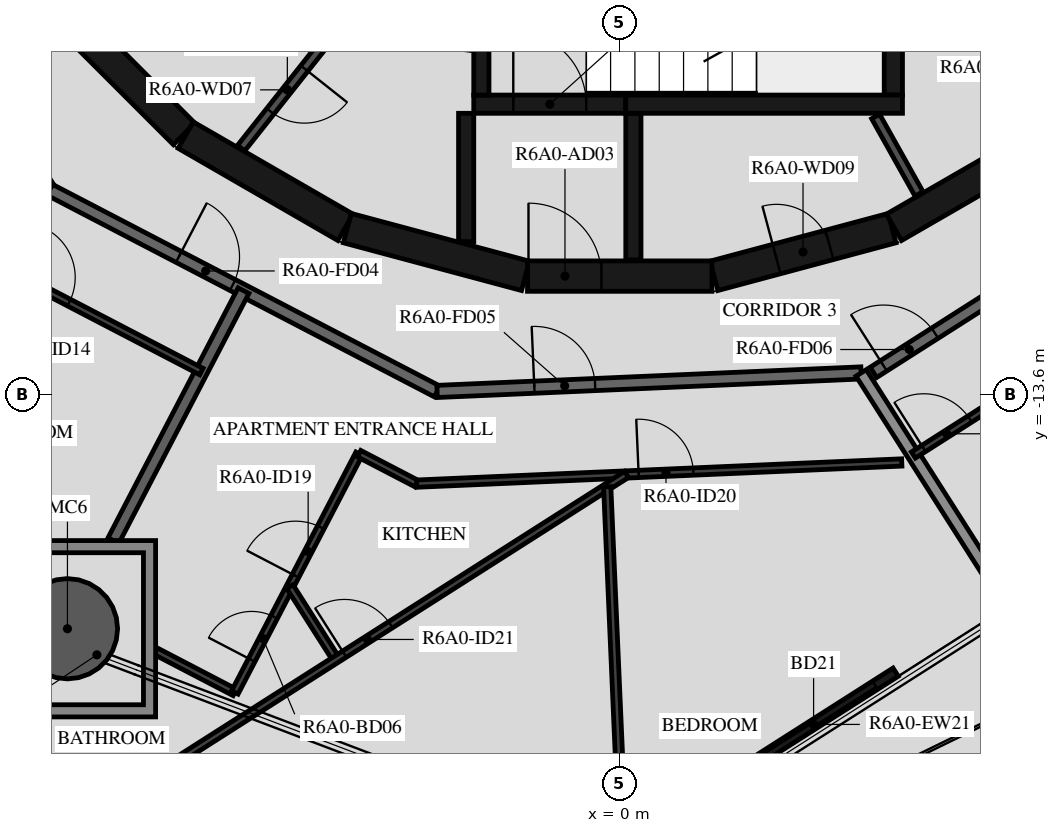
"""IFC4 building model, lengths in metres.
Left out: names, types, materials, properties, quantities, classifications, styles, units other than length and angle.
Written with IfcOpenShell. Run it as: python <this file> out.ifc"""

import sys

from ifc_helpers import new_model, si_unit, direction, frame, frame_2d, origin, origin_2d, place, context, subcontext, project, spatial, polyline, rectangle, hollow_circle, outline, extrude, element, fill, save


model = new_model("IFC4")
c1 = context("Model", 3, precision=1e-05, world=origin(), true_north=direction((0.0, 1.0)))
c2 = subcontext(c1, "Body", "Model", "MODEL_VIEW")
j1 = project(units=[si_unit("LENGTHUNIT", "METRE"), si_unit("PLANEANGLEUNIT", "RADIAN")], contexts=[c1])
p1 = place(None, origin())
s1 = spatial("IfcSite", under=j1, at=p1, CompositionType="ELEMENT")
p2 = place(p1, origin())
s2 = spatial("IfcBuilding", under=s1, at=p2, CompositionType="ELEMENT")
p3 = place(p2, frame((0.0, 0.0, 226.7)))
s3 = spatial("IfcBuildingStorey", under=s2, at=p3, CompositionType="ELEMENT", Elevation=226.7)
p4 = place(p3, frame((-9.082, -17.446, -0.45), z_axis=(0.0, 0.0, 1.0), x_axis=(1.0, 0.0, 0.0)))
e1 = element("IfcColumn", 1, at=p4, inside=s3, PredefinedType="COLUMN", context=c2, shape_type="SweptSolid", body=[
    extrude(hollow_circle(Radius=0.825, WallThickness=0.04, at=origin_2d()), origin(), (0.0, 0.0, 1.0), 3.57),
])
p5 = place(p3, frame((1.839, -19.879, 0.0), z_axis=(0.0, 0.0, 1.0), x_axis=(0.843419508298, 0.53725555653, 0.0)))
e2 = element("IfcWall", 2, at=p5, inside=s3, PredefinedType="STANDARD", context=c2, shape_type="SweptSolid", body=[
    extrude(rectangle(XDim=3.2, YDim=0.16, at=frame_2d((1.6, 0.0))), origin(), (0.0, 0.0, 1.0), 3.12),
])
p6 = place(p5, frame((0.4, 0.0, 0.0)))
e3 = element("IfcOpeningElement", 3, at=p6, cuts=e2, PredefinedType="OPENING", context=c2, shape_type="SweptSolid", body=[
    extrude(rectangle(XDim=2.4, YDim=2.4, at=frame_2d((1.2, 1.2))), frame((0.0, 0.09, 0.0), z_axis=(0.0, -1.0, 0.0), x_axis=(1.0, 0.0, 0.0)), (0.0, 0.0, 1.0), 0.18),
])
p7 = place(p3, frame((1.55, -11.643, 0.0), z_axis=(0.0, 0.0, 1.0), x_axis=(0.965948410781, 0.258734743916, 0.0)))
e4 = element("IfcWall", 4, at=p7, inside=s3, PredefinedType="SHEAR", context=c2, shape_type="SweptSolid", body=[
    extrude(rectangle(XDim=3.033, YDim=0.5, at=frame_2d((1.516, 0.0))), origin(), (0.0, 0.0, 1.0), 3.12),
])
p8 = place(p7, frame((1.066, 0.0, 0.0)))
e5 = element("IfcOpeningElement", 5, at=p8, cuts=e4, PredefinedType="OPENING", context=c2, shape_type="SweptSolid", body=[
    extrude(rectangle(XDim=0.9, YDim=2.1, at=frame_2d((0.45, 1.05))), frame((0.0, 0.26, 0.0), z_axis=(0.0, -1.0, 0.0), x_axis=(1.0, 0.0, 0.0)), (0.0, 0.0, 1.0), 0.52),
])
p9 = place(p3, frame((4.51, -10.845, 0.0), z_axis=(0.0, 0.0, 1.0), x_axis=(0.865975092491, 0.500087131594, 0.0)))
e6 = element("IfcWall", 6, at=p9, inside=s3, PredefinedType="SHEAR", context=c2, shape_type="SweptSolid", body=[
    extrude(rectangle(XDim=3.033, YDim=0.5, at=frame_2d((1.516, 0.0))), origin(), (0.0, 0.0, 1.0), 3.12),
])
p10 = place(p3, frame((-9.308, -7.164, 0.0), z_axis=(0.0, 0.0, 1.0), x_axis=(0.707106781187, -0.707106781187, 0.0)))
e7 = element("IfcWall", 7, at=p10, inside=s3, PredefinedType="SHEAR", context=c2, shape_type="SweptSolid", body=[
    extrude(rectangle(XDim=3.032, YDim=0.5, at=frame_2d((1.516, 0.0))), origin(), (0.0, 0.0, 1.0), 3.12),
])
for number, where, z_axis, x_axis in (
    (8, (-7.137, -9.329, 0.0), (0.0, 0.0, 1.0), (0.866, -0.5, 0.0)),
    (9, (-4.479, -10.858, 0.0), (0.0, 0.0, 1.0), (0.966, -0.259, 0.0)),
):
    element("IfcWall", number, at=place(p3, frame(where, z_axis=z_axis, x_axis=x_axis)), inside=s3, PredefinedType="SHEAR", context=c2, shape_type="SweptSolid", body=[
        extrude(rectangle(XDim=3.033, YDim=0.5, at=frame_2d((1.516, 0.0))), origin(), (0.0, 0.0, 1.0), 3.12),
    ])
p11 = place(p3, frame((-1.516, -11.647, 0.0), z_axis=(0.0, 0.0, 1.0), x_axis=(1.0, 0.0, 0.0)))
e10 = element("IfcWall", 10, at=p11, inside=s3, PredefinedType="SHEAR", context=c2, shape_type="SweptSolid", body=[
    extrude(rectangle(XDim=3.033, YDim=0.5, at=frame_2d((1.516, 0.0))), origin(), (0.0, 0.0, 1.0), 3.12),
])
p12 = place(p11, frame((0.016, 0.0, 0.0)))
e11 = element("IfcOpeningElement", 11, at=p12, cuts=e10, PredefinedType="OPENING", context=c2, shape_type="SweptSolid", body=[
    extrude(rectangle(XDim=1.2, YDim=2.1, at=frame_2d((0.6, 1.05))), frame((0.0, 0.26, 0.0), z_axis=(0.0, -1.0, 0.0), x_axis=(1.0, 0.0, 0.0)), (0.0, 0.0, 1.0), 0.52),
])
p13 = place(p3, frame((-2.275, -8.67, 0.0), z_axis=(0.0, 0.0, 1.0), x_axis=(0.0, 1.0, 0.0)))
e12 = element("IfcWall", 12, at=p13, inside=s3, PredefinedType="SHEAR", context=c2, shape_type="SweptSolid", body=[
    extrude(rectangle(XDim=3.32, YDim=0.25, at=frame_2d((1.66, 0.0))), origin(), (0.0, 0.0, 1.0), 3.12),
])
p14 = place(p3, frame((4.5, -8.67, 0.0), z_axis=(0.0, 0.0, 1.0), x_axis=(0.0, 1.0, 0.0)))
e13 = element("IfcWall", 13, at=p14, inside=s3, PredefinedType="SHEAR", context=c2, shape_type="SweptSolid", body=[
    extrude(rectangle(XDim=3.32, YDim=0.3, at=frame_2d((1.66, 0.0))), origin(), (0.0, 0.0, 1.0), 3.12),
])
p15 = place(p3, frame((0.1, -8.82, 0.0), z_axis=(0.0, 0.0, 1.0), x_axis=(1.0, 0.0, 0.0)))
e14 = element("IfcWall", 14, at=p15, inside=s3, PredefinedType="SHEAR", context=c2, shape_type="SweptSolid", body=[
    extrude(rectangle(XDim=4.55, YDim=0.3, at=frame_2d((2.275, 0.0))), origin(), (0.0, 0.0, 1.0), 3.12),
])
p16 = place(p3, frame((-2.4, -8.82, 0.0), z_axis=(0.0, 0.0, 1.0), x_axis=(1.0, 0.0, 0.0)))
e15 = element("IfcWall", 15, at=p16, inside=s3, PredefinedType="SHEAR", context=c2, shape_type="SweptSolid", body=[
    extrude(rectangle(XDim=2.5, YDim=0.3, at=frame_2d((1.25, 0.0))), origin(), (0.0, 0.0, 1.0), 3.12),
])
p17 = place(p16, frame((0.65, 0.0, 0.0)))
e16 = element("IfcOpeningElement", 16, at=p17, cuts=e15, PredefinedType="OPENING", context=c2, shape_type="SweptSolid", body=[
    extrude(rectangle(XDim=1.2, YDim=2.1, at=frame_2d((0.6, 1.05))), frame((0.0, 0.16, 0.0), z_axis=(0.0, -1.0, 0.0), x_axis=(1.0, 0.0, 0.0)), (0.0, 0.0, 1.0), 0.32),
])
p18 = place(p3, frame((-2.525, -8.97, 0.0), z_axis=(0.0, 0.0, 1.0), x_axis=(0.0, -1.0, 0.0)))
e17 = element("IfcWall", 17, at=p18, inside=s3, PredefinedType="SHEAR", context=c2, shape_type="SweptSolid", body=[
    extrude(rectangle(XDim=2.11, YDim=0.25, at=frame_2d((1.055, 0.0))), origin(), (0.0, 0.0, 1.0), 3.12),
])
p19 = place(p3, frame((0.225, -8.97, 0.0), z_axis=(0.0, 0.0, 1.0), x_axis=(0.0, -1.0, 0.0)))
e18 = element("IfcWall", 18, at=p19, inside=s3, PredefinedType="SHEAR", context=c2, shape_type="SweptSolid", body=[
    extrude(rectangle(XDim=2.41, YDim=0.25, at=frame_2d((1.205, 0.0))), origin(), (0.0, 0.0, 1.0), 3.12),
])
p20 = place(p3, frame((4.922, -10.296, 0.0), z_axis=(0.0, 0.0, 1.0), x_axis=(-0.48860846254, 0.872503163509, 0.0)))
e19 = element("IfcWall", 19, at=p20, inside=s3, PredefinedType="PARTITIONING", context=c2, shape_type="SweptSolid", body=[
    extrude(rectangle(XDim=1.459, YDim=0.15, at=frame_2d((0.73, 0.0))), origin(), (0.0, 0.0, 1.0), 3.12),
])
p21 = place(p3, frame((-4.706, -7.625, 0.0), z_axis=(0.0, 0.0, 1.0), x_axis=(-0.621392599334, -0.783499353856, 0.0)))
e20 = element("IfcWall", 20, at=p21, inside=s3, PredefinedType="PARTITIONING", context=c2, shape_type="SweptSolid", body=[
    extrude(rectangle(XDim=2.447, YDim=0.15, at=frame_2d((1.224, 0.0))), origin(), (0.0, 0.0, 1.0), 3.12),
])
p22 = place(p21, frame((0.774, 0.0, 0.0)))
e21 = element("IfcOpeningElement", 21, at=p22, cuts=e20, PredefinedType="OPENING", context=c2, shape_type="SweptSolid", body=[
    extrude(rectangle(XDim=0.9, YDim=2.1, at=frame_2d((0.45, 1.05))), frame((0.0, 0.085, 0.0), z_axis=(0.0, -1.0, 0.0), x_axis=(1.0, 0.0, 0.0)), (0.0, 0.0, 1.0), 0.17),
])
p23 = place(p3, frame((-11.565, -6.786, 0.0), z_axis=(0.0, 0.0, 1.0), x_axis=(0.537297327359, -0.843392898958, 0.0)))
e22 = element("IfcWall", 22, at=p23, inside=s3, PredefinedType="STANDARD", context=c2, shape_type="SweptSolid", body=[
    extrude(rectangle(XDim=4.081, YDim=0.2, at=frame_2d((2.041, 0.0))), origin(), (0.0, 0.0, 1.0), 3.12),
])
p24 = place(p3, frame((-9.372, -10.228, 0.0), z_axis=(0.0, 0.0, 1.0), x_axis=(0.887005184532, -0.461759464021, 0.0)))
e23 = element("IfcWall", 23, at=p24, inside=s3, PredefinedType="STANDARD", context=c2, shape_type="SweptSolid", body=[
    extrude(rectangle(XDim=7.181, YDim=0.2, at=frame_2d((3.591, 0.0))), origin(), (0.0, 0.0, 1.0), 3.12),
])
p25 = place(p24, frame((2.391, 0.0, 0.0)))
e24 = element("IfcOpeningElement", 24, at=p25, cuts=e23, PredefinedType="OPENING", context=c2, shape_type="SweptSolid", body=[
    extrude(rectangle(XDim=1.0, YDim=2.1, at=frame_2d((0.5, 1.05))), frame((0.0, 0.11, 0.0), z_axis=(0.0, -1.0, 0.0), x_axis=(1.0, 0.0, 0.0)), (0.0, 0.0, 1.0), 0.22),
])
p26 = place(p3, frame((-3.003, -13.544, 0.0), z_axis=(0.0, 0.0, 1.0), x_axis=(0.999048221872, 0.043619380718, 0.0)))
e25 = element("IfcWall", 25, at=p26, inside=s3, PredefinedType="STANDARD", context=c2, shape_type="SweptSolid", body=[
    extrude(rectangle(XDim=6.979, YDim=0.2, at=frame_2d((3.49, 0.0))), origin(), (0.0, 0.0, 1.0), 3.12),
])
p27 = place(p26, frame((1.6, 0.0, 0.0)))
e26 = element("IfcOpeningElement", 26, at=p27, cuts=e25, PredefinedType="OPENING", context=c2, shape_type="SweptSolid", body=[
    extrude(rectangle(XDim=1.0, YDim=2.1, at=frame_2d((0.5, 1.05))), frame((0.0, 0.11, 0.0), z_axis=(0.0, -1.0, 0.0), x_axis=(1.0, 0.0, 0.0)), (0.0, 0.0, 1.0), 0.22),
])
p28 = place(p3, frame((4.172, -13.231, 0.0), z_axis=(0.0, 0.0, 1.0), x_axis=(0.843388394728, 0.537304397561, 0.0)))
e27 = element("IfcWall", 27, at=p28, inside=s3, PredefinedType="STANDARD", context=c2, shape_type="SweptSolid", body=[
    extrude(rectangle(XDim=7.181, YDim=0.2, at=frame_2d((3.59, 0.0))), origin(), (0.0, 0.0, 1.0), 3.12),
])
p29 = place(p28, frame((0.2, 0.0, 0.0)))
e28 = element("IfcOpeningElement", 28, at=p29, cuts=e27, PredefinedType="OPENING", context=c2, shape_type="SweptSolid", body=[
    extrude(rectangle(XDim=1.0, YDim=2.1, at=frame_2d((0.5, 1.05))), frame((0.0, 0.11, 0.0), z_axis=(0.0, -1.0, 0.0), x_axis=(1.0, 0.0, 0.0)), (0.0, 0.0, 1.0), 0.22),
])
p30 = place(p3, frame((-8.326, -15.996, 0.0), z_axis=(0.0, 0.0, 1.0), x_axis=(0.461739255077, 0.887015704664, 0.0)))
e29 = element("IfcWall", 29, at=p30, inside=s3, PredefinedType="STANDARD", context=c2, shape_type="SweptSolid", body=[
    extrude(rectangle(XDim=4.633, YDim=0.2, at=frame_2d((2.317, 0.0))), origin(), (0.0, 0.0, 1.0), 3.12),
])
p31 = place(p3, frame((6.407, -17.064, 0.0), z_axis=(0.0, 0.0, 1.0), x_axis=(-0.537324777979, 0.843375410461, 0.0)))
e30 = element("IfcWall", 30, at=p31, inside=s3, PredefinedType="STANDARD", context=c2, shape_type="SweptSolid", body=[
    extrude(rectangle(XDim=4.535, YDim=0.2, at=frame_2d((2.268, 0.0))), origin(), (0.0, 0.0, 1.0), 2.73),
])
p32 = place(p3, frame((-10.421, -11.373, 0.0), z_axis=(0.0, 0.0, 1.0), x_axis=(0.887006451745, -0.461757029792, 0.0)))
e31 = element("IfcWall", 31, at=p32, inside=s3, PredefinedType="PARTITIONING", context=c2, shape_type="SweptSolid", body=[
    extrude(rectangle(XDim=3.992, YDim=0.12, at=frame_2d((1.996, 0.0))), origin(), (0.0, 0.0, 1.0), 3.12),
])
p33 = place(p32, frame((0.639, 0.0, 0.0)))
e32 = element("IfcOpeningElement", 32, at=p33, cuts=e31, PredefinedType="OPENING", context=c2, shape_type="SweptSolid", body=[
    extrude(rectangle(XDim=0.9, YDim=2.1, at=frame_2d((0.45, 1.05))), frame((0.0, 0.07, 0.0), z_axis=(0.0, -1.0, 0.0), x_axis=(1.0, 0.0, 0.0)), (0.0, 0.0, 1.0), 0.14),
])
p34 = place(p3, frame((-7.632, -17.815, 0.0), z_axis=(0.0, 0.0, 1.0), x_axis=(0.886960889958, -0.461844540602, 0.0)))
e33 = element("IfcWall", 33, at=p34, inside=s3, PredefinedType="PARTITIONING", context=c2, shape_type="SweptSolid", body=[
    extrude(rectangle(XDim=1.469, YDim=0.12, at=frame_2d((0.734, 0.0))), origin(), (0.0, 0.0, 1.0), 3.12),
])
p35 = place(p3, frame((-6.329, -18.494, 0.0), z_axis=(0.0, 0.0, 1.0), x_axis=(0.461759058182, 0.887005395805, 0.0)))
e34 = element("IfcWall", 34, at=p35, inside=s3, PredefinedType="PARTITIONING", context=c2, shape_type="SweptSolid", body=[
    extrude(rectangle(XDim=4.427, YDim=0.12, at=frame_2d((2.213, 0.0))), origin(), (0.0, 0.0, 1.0), 3.12),
])
p36 = place(p35, frame((0.6, 0.0, 0.0)))
e35 = element("IfcOpeningElement", 35, at=p36, cuts=e34, PredefinedType="OPENING", context=c2, shape_type="SweptSolid", body=[
    extrude(rectangle(XDim=0.8, YDim=2.1, at=frame_2d((0.4, 1.05))), frame((0.0, 0.07, 0.0), z_axis=(0.0, -1.0, 0.0), x_axis=(1.0, 0.0, 0.0)), (0.0, 0.0, 1.0), 0.14),
])
p37 = place(p35, frame((2.161, 0.0, 0.0)))
e36 = element("IfcOpeningElement", 36, at=p37, cuts=e34, PredefinedType="OPENING", context=c2, shape_type="SweptSolid", body=[
    extrude(rectangle(XDim=0.9, YDim=2.1, at=frame_2d((0.45, 1.05))), frame((0.0, 0.07, 0.0), z_axis=(0.0, -1.0, 0.0), x_axis=(1.0, 0.0, 0.0)), (0.0, 0.0, 1.0), 0.14),
])
p38 = place(p3, frame((-4.285, -14.567, 0.0), z_axis=(0.0, 0.0, 1.0), x_axis=(0.887033177378, -0.46170568789, 0.0)))
e37 = element("IfcWall", 37, at=p38, inside=s3, PredefinedType="PARTITIONING", context=c2, shape_type="SweptSolid", body=[
    extrude(rectangle(XDim=1.067, YDim=0.12, at=frame_2d((0.534, 0.0))), origin(), (0.0, 0.0, 1.0), 3.12),
])
p39 = place(p3, frame((-3.339, -15.06, 0.0), z_axis=(0.0, 0.0, 1.0), x_axis=(0.999047716945, 0.043630943905, 0.0)))
e38 = element("IfcWall", 38, at=p39, inside=s3, PredefinedType="PARTITIONING", context=c2, shape_type="SweptSolid", body=[
    extrude(rectangle(XDim=7.985, YDim=0.12, at=frame_2d((3.992, 0.0))), origin(), (0.0, 0.0, 1.0), 3.12),
])
p40 = place(p39, frame((3.654, 0.0, 0.0)))
e39 = element("IfcOpeningElement", 39, at=p40, cuts=e38, PredefinedType="OPENING", context=c2, shape_type="SweptSolid", body=[
    extrude(rectangle(XDim=0.9, YDim=2.1, at=frame_2d((0.45, 1.05))), frame((0.0, 0.07, 0.0), z_axis=(0.0, -1.0, 0.0), x_axis=(1.0, 0.0, 0.0)), (0.0, 0.0, 1.0), 0.14),
])
p41 = place(p3, frame((-4.662, -17.95, 0.0), z_axis=(0.0, 0.0, 1.0), x_axis=(-0.537254271207, 0.843420327043, 0.0)))
e40 = element("IfcWall", 40, at=p41, inside=s3, PredefinedType="PARTITIONING", context=c2, shape_type="SweptSolid", body=[
    extrude(rectangle(XDim=1.418, YDim=0.12, at=frame_2d((0.709, 0.0))), origin(), (0.0, 0.0, 1.0), 3.12),
])
p42 = place(p3, frame((-7.322, -19.645, 0.0), z_axis=(0.0, 0.0, 1.0), x_axis=(0.843385361817, 0.537309158188, 0.0)))
e41 = element("IfcWall", 41, at=p42, inside=s3, PredefinedType="PARTITIONING", context=c2, shape_type="SweptSolid", body=[
    extrude(rectangle(XDim=8.814, YDim=0.12, at=frame_2d((4.407, 0.0))), origin(), (0.0, 0.0, 1.0), 3.12),
])
p43 = place(p42, frame((3.314, 0.0, 0.0)))
e42 = element("IfcOpeningElement", 42, at=p43, cuts=e41, PredefinedType="OPENING", context=c2, shape_type="SweptSolid", body=[
    extrude(rectangle(XDim=0.9, YDim=2.1, at=frame_2d((0.45, 1.05))), frame((0.0, 0.07, 0.0), z_axis=(0.0, -1.0, 0.0), x_axis=(1.0, 0.0, 0.0)), (0.0, 0.0, 1.0), 0.14),
])
p44 = place(p3, frame((0.056, -21.11, 0.0), z_axis=(0.0, 0.0, 1.0), x_axis=(-0.043629559022, 0.999047777426, 0.0)))
e43 = element("IfcWall", 43, at=p44, inside=s3, PredefinedType="PARTITIONING", context=c2, shape_type="SweptSolid", body=[
    extrude(rectangle(XDim=6.004, YDim=0.12, at=frame_2d((3.002, 0.0))), origin(), (0.0, 0.0, 1.0), 3.12),
])
p45 = place(p3, frame((4.83, -14.59, 0.0), z_axis=(0.0, 0.0, 1.0), x_axis=(0.843393042763, 0.537297101629, 0.0)))
e44 = element("IfcWall", 44, at=p45, inside=s3, PredefinedType="PARTITIONING", context=c2, shape_type="SweptSolid", body=[
    extrude(rectangle(XDim=7.53, YDim=0.12, at=frame_2d((3.765, 0.0))), origin(), (0.0, 0.0, 1.0), 3.12),
])
p46 = place(p45, frame((0.2, 0.0, 0.0)))
e45 = element("IfcOpeningElement", 45, at=p46, cuts=e44, PredefinedType="OPENING", context=c2, shape_type="SweptSolid", body=[
    extrude(rectangle(XDim=0.9, YDim=2.1, at=frame_2d((0.45, 1.05))), frame((0.0, 0.07, 0.0), z_axis=(0.0, -1.0, 0.0), x_axis=(1.0, 0.0, 0.0)), (0.0, 0.0, 1.0), 0.14),
])
p47 = place(p3, origin())
e46 = element("IfcWall", 46, at=p47, inside=s3, PredefinedType="STANDARD", context=c2, shape_type="SweptSolid", body=[
    extrude(outline(polyline([(-7.632, -15.996), (-7.632, -18.896), (-10.532, -18.896), (-10.532, -15.996), (-7.632, -15.996)]), holes=[polyline([(-10.332, -18.696), (-7.832, -18.696), (-7.832, -16.196), (-10.332, -16.196), (-10.332, -18.696)])]), origin(), (0.0, 0.0, 1.0), 3.12),
])
p48 = place(p6, origin())
e47 = element("IfcDoor", 47, at=p48, inside=s3, OperationType="DOUBLE_DOOR_SLIDING", PredefinedType="DOOR", context=c2, shape_type="SweptSolid", body=[
    extrude(rectangle(XDim=2.4, YDim=2.4, at=frame_2d((1.2, 1.2))), frame((0.0, 0.025, 0.0), z_axis=(0.0, -1.0, 0.0), x_axis=(1.0, 0.0, 0.0)), (0.0, 0.0, 1.0), 0.05),
])
fill(e3, e47)
p49 = place(p17, origin())
e48 = element("IfcDoor", 48, at=p49, inside=s3, OperationType="SINGLE_SWING_LEFT", PredefinedType="DOOR", context=c2, shape_type="SweptSolid", body=[
    extrude(rectangle(XDim=1.2, YDim=2.1, at=frame_2d((0.6, 1.05))), frame((0.0, 0.025, 0.0), z_axis=(0.0, -1.0, 0.0), x_axis=(1.0, 0.0, 0.0)), (0.0, 0.0, 1.0), 0.05),
])
fill(e16, e48)
p50 = place(p12, origin())
e49 = element("IfcDoor", 49, at=p50, inside=s3, OperationType="SINGLE_SWING_RIGHT", PredefinedType="DOOR", context=c2, shape_type="SweptSolid", body=[
    extrude(rectangle(XDim=1.2, YDim=2.1, at=frame_2d((0.6, 1.05))), frame((0.0, 0.025, 0.0), z_axis=(0.0, -1.0, 0.0), x_axis=(1.0, 0.0, 0.0)), (0.0, 0.0, 1.0), 0.05),
])
fill(e11, e49)
p51 = place(p22, origin())
e50 = element("IfcDoor", 50, at=p51, inside=s3, OperationType="SINGLE_SWING_LEFT", PredefinedType="DOOR", context=c2, shape_type="SweptSolid", body=[
    extrude(rectangle(XDim=0.9, YDim=2.1, at=frame_2d((0.45, 1.05))), frame((0.0, 0.025, 0.0), z_axis=(0.0, -1.0, 0.0), x_axis=(1.0, 0.0, 0.0)), (0.0, 0.0, 1.0), 0.05),
])
fill(e21, e50)
p52 = place(p8, origin())
e51 = element("IfcDoor", 51, at=p52, inside=s3, OperationType="SINGLE_SWING_LEFT", PredefinedType="DOOR", context=c2, shape_type="SweptSolid", body=[
    extrude(rectangle(XDim=0.9, YDim=2.1, at=frame_2d((0.45, 1.05))), frame((0.0, 0.025, 0.0), z_axis=(0.0, -1.0, 0.0), x_axis=(1.0, 0.0, 0.0)), (0.0, 0.0, 1.0), 0.05),
])
fill(e5, e51)
p53 = place(p25, origin())
e52 = element("IfcDoor", 52, at=p53, inside=s3, OperationType="SINGLE_SWING_RIGHT", PredefinedType="DOOR", context=c2, shape_type="SweptSolid", body=[
    extrude(rectangle(XDim=1.0, YDim=2.1, at=frame_2d((0.5, 1.05))), frame((0.0, 0.025, 0.0), z_axis=(0.0, -1.0, 0.0), x_axis=(1.0, 0.0, 0.0)), (0.0, 0.0, 1.0), 0.05),
])
fill(e24, e52)
p54 = place(p33, origin())
e53 = element("IfcDoor", 53, at=p54, inside=s3, OperationType="SINGLE_SWING_RIGHT", PredefinedType="DOOR", context=c2, shape_type="SweptSolid", body=[
    extrude(rectangle(XDim=0.9, YDim=2.1, at=frame_2d((0.45, 1.05))), frame((0.0, 0.025, 0.0), z_axis=(0.0, -1.0, 0.0), x_axis=(1.0, 0.0, 0.0)), (0.0, 0.0, 1.0), 0.05),
])
fill(e32, e53)
p55 = place(p27, origin())
e54 = element("IfcDoor", 54, at=p55, inside=s3, OperationType="SINGLE_SWING_LEFT", PredefinedType="DOOR", context=c2, shape_type="SweptSolid", body=[
    extrude(rectangle(XDim=1.0, YDim=2.1, at=frame_2d((0.5, 1.05))), frame((0.0, 0.025, 0.0), z_axis=(0.0, -1.0, 0.0), x_axis=(1.0, 0.0, 0.0)), (0.0, 0.0, 1.0), 0.05),
])
fill(e26, e54)
p56 = place(p36, origin())
e55 = element("IfcDoor", 55, at=p56, inside=s3, OperationType="SINGLE_SWING_LEFT", PredefinedType="DOOR", context=c2, shape_type="SweptSolid", body=[
    extrude(rectangle(XDim=0.8, YDim=2.1, at=frame_2d((0.4, 1.05))), frame((0.0, 0.025, 0.0), z_axis=(0.0, -1.0, 0.0), x_axis=(1.0, 0.0, 0.0)), (0.0, 0.0, 1.0), 0.05),
])
fill(e35, e55)
p57 = place(p37, origin())
e56 = element("IfcDoor", 56, at=p57, inside=s3, OperationType="SINGLE_SWING_LEFT", PredefinedType="DOOR", context=c2, shape_type="SweptSolid", body=[
    extrude(rectangle(XDim=0.9, YDim=2.1, at=frame_2d((0.45, 1.05))), frame((0.0, 0.025, 0.0), z_axis=(0.0, -1.0, 0.0), x_axis=(1.0, 0.0, 0.0)), (0.0, 0.0, 1.0), 0.05),
])
fill(e36, e56)
p58 = place(p40, origin())
e57 = element("IfcDoor", 57, at=p58, inside=s3, OperationType="SINGLE_SWING_LEFT", PredefinedType="DOOR", context=c2, shape_type="SweptSolid", body=[
    extrude(rectangle(XDim=0.9, YDim=2.1, at=frame_2d((0.45, 1.05))), frame((0.0, 0.025, 0.0), z_axis=(0.0, -1.0, 0.0), x_axis=(1.0, 0.0, 0.0)), (0.0, 0.0, 1.0), 0.05),
])
fill(e39, e57)
p59 = place(p43, origin())
e58 = element("IfcDoor", 58, at=p59, inside=s3, OperationType="SINGLE_SWING_LEFT", PredefinedType="DOOR", context=c2, shape_type="SweptSolid", body=[
    extrude(rectangle(XDim=0.9, YDim=2.1, at=frame_2d((0.45, 1.05))), frame((0.0, 0.025, 0.0), z_axis=(0.0, -1.0, 0.0), x_axis=(1.0, 0.0, 0.0)), (0.0, 0.0, 1.0), 0.05),
])
fill(e42, e58)
p60 = place(p29, origin())
e59 = element("IfcDoor", 59, at=p60, inside=s3, OperationType="SINGLE_SWING_LEFT", PredefinedType="DOOR", context=c2, shape_type="SweptSolid", body=[
    extrude(rectangle(XDim=1.0, YDim=2.1, at=frame_2d((0.5, 1.05))), frame((0.0, 0.025, 0.0), z_axis=(0.0, -1.0, 0.0), x_axis=(1.0, 0.0, 0.0)), (0.0, 0.0, 1.0), 0.05),
])
fill(e28, e59)
p61 = place(p46, origin())
e60 = element("IfcDoor", 60, at=p61, inside=s3, OperationType="SINGLE_SWING_LEFT", PredefinedType="DOOR", context=c2, shape_type="SweptSolid", body=[
    extrude(rectangle(XDim=0.9, YDim=2.1, at=frame_2d((0.45, 1.05))), frame((0.0, 0.025, 0.0), z_axis=(0.0, -1.0, 0.0), x_axis=(1.0, 0.0, 0.0)), (0.0, 0.0, 1.0), 0.05),
])
fill(e45, e60)
save(model, sys.argv[1])
